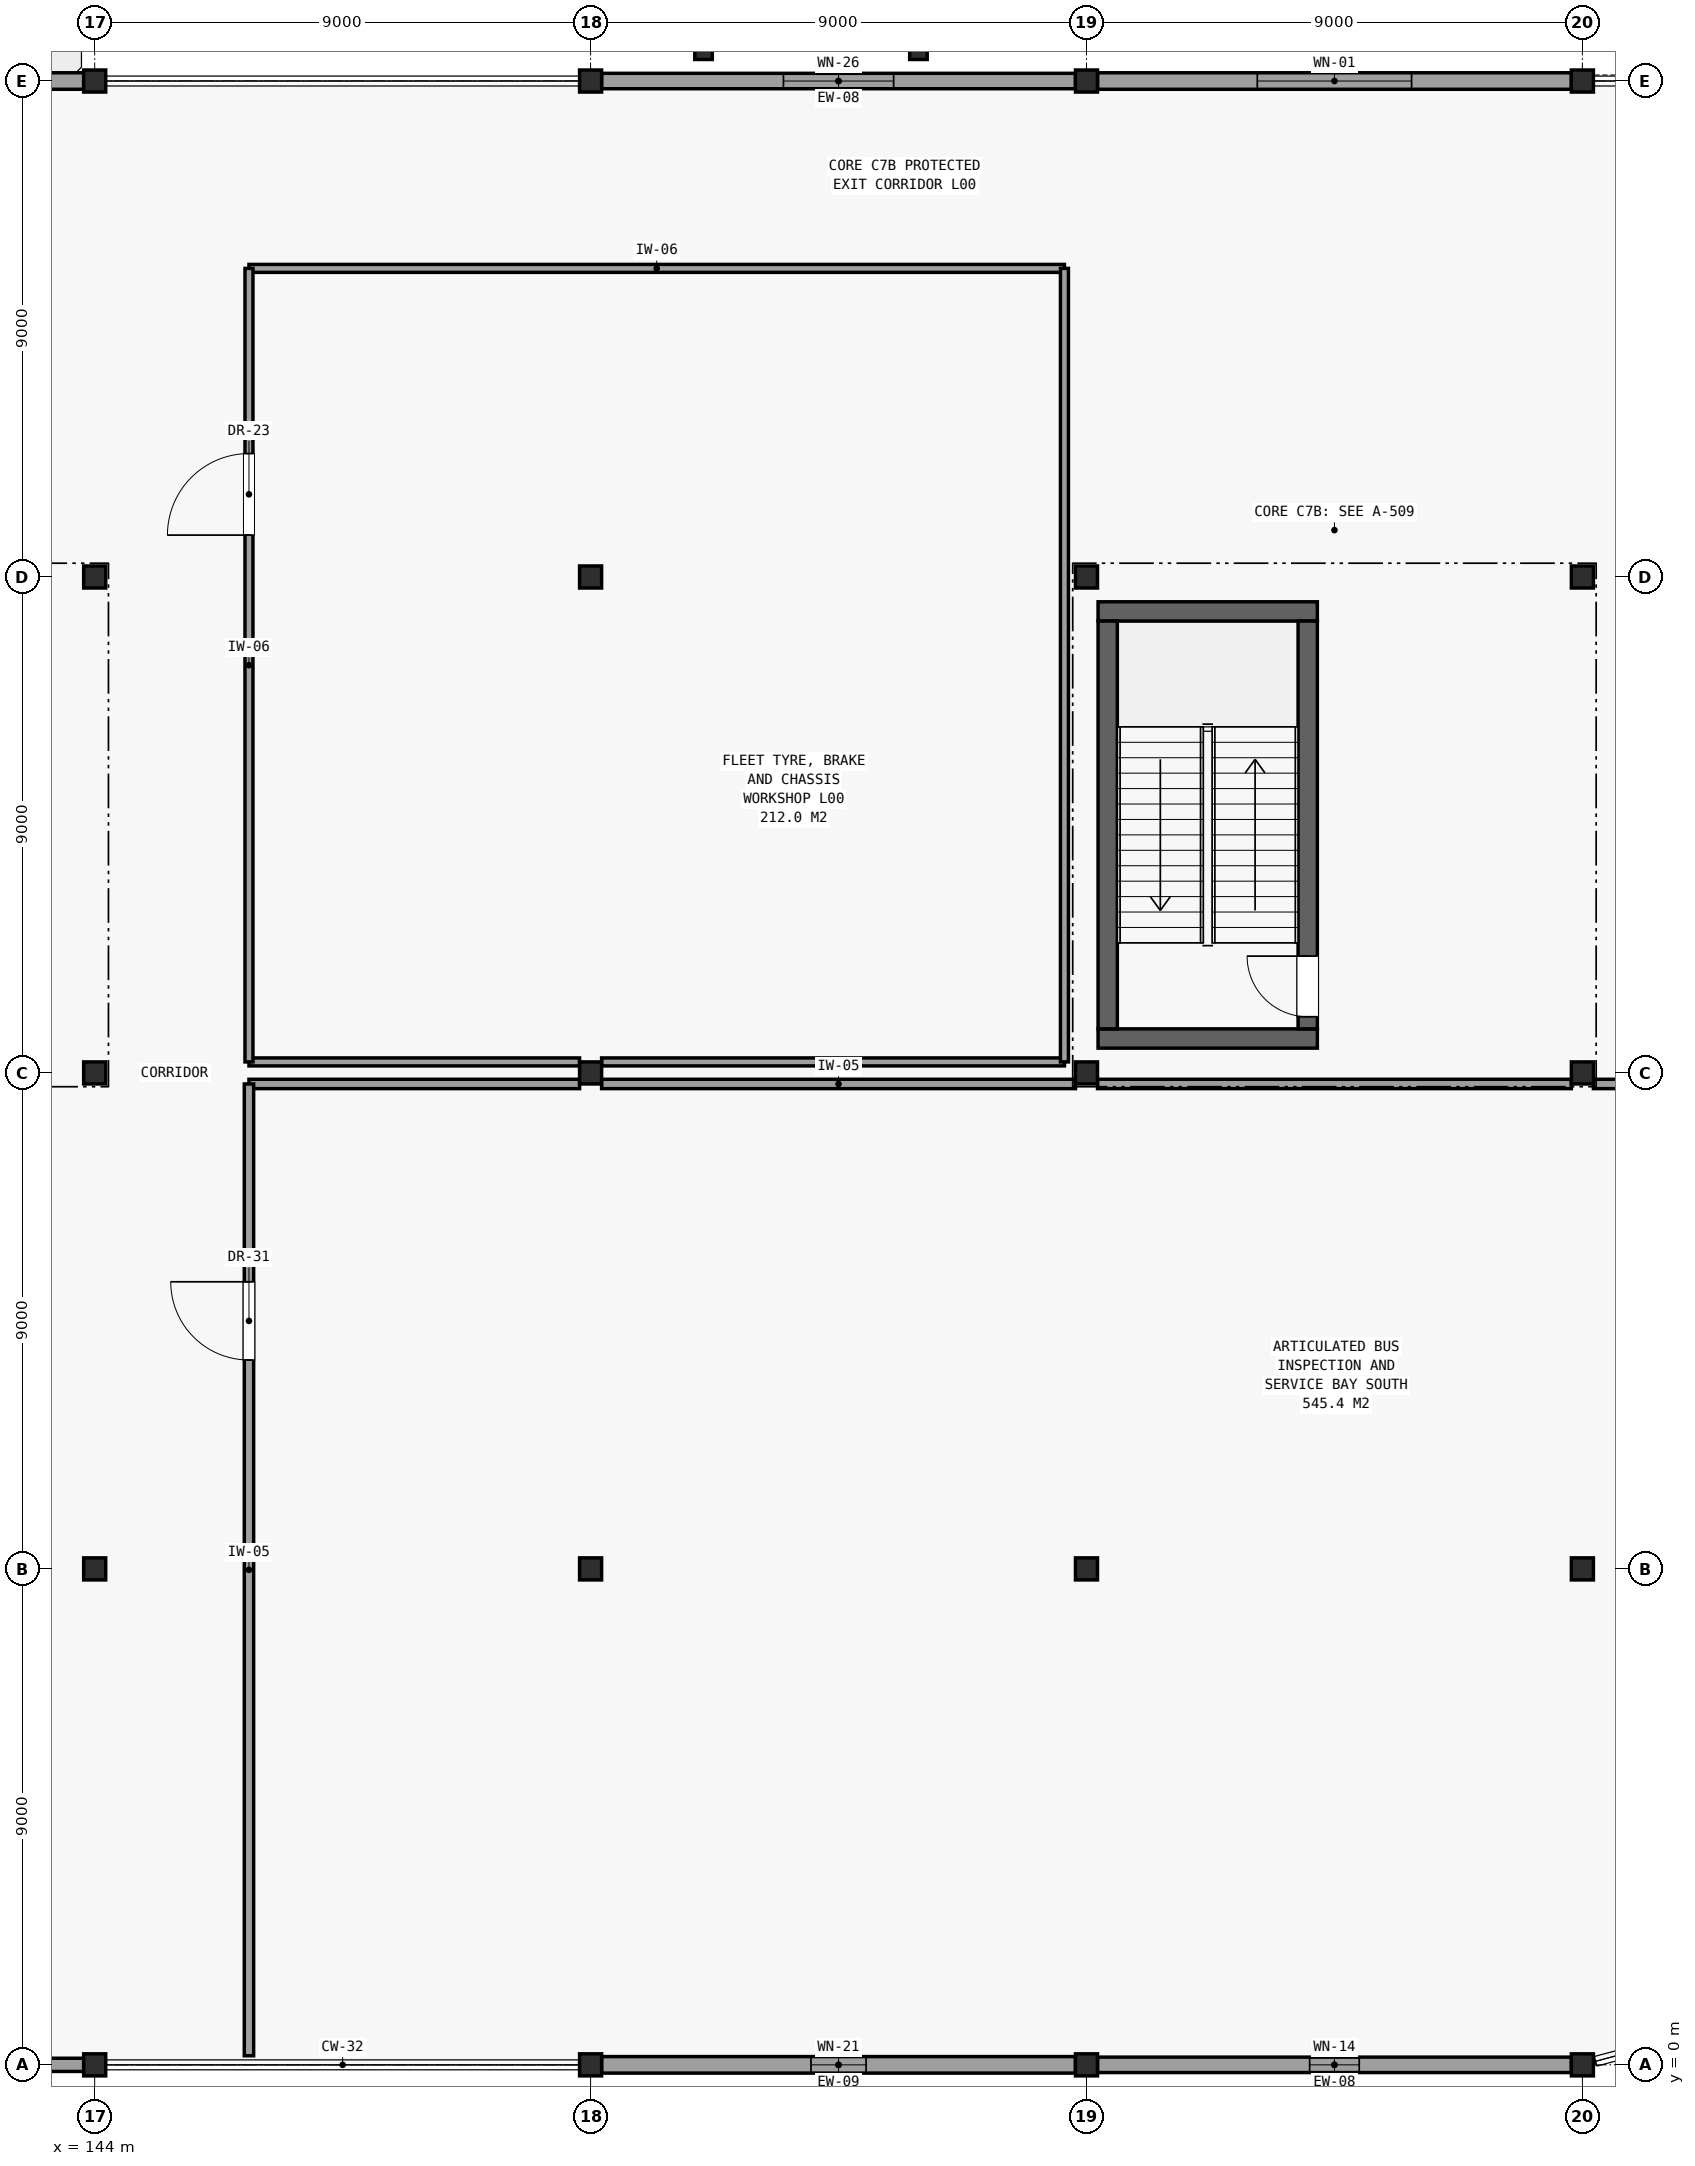
"""IFC4 building model, lengths in metres.
Left out: names, types, materials, properties, quantities, classifications, styles, units other than length and angle.
Written with IfcOpenShell. Run it as: python <this file> out.ifc"""

import sys

from ifc_helpers import new_model, si_unit, direction, frame, frame_2d, origin, origin_2d, place, context, subcontext, project, spatial, rectangle, hollow_rectangle, hollow_circle, extrude, element, fill, save


model = new_model("IFC4")
c1 = context("Model", 3, precision=1e-05, world=origin(), true_north=direction((0.0, 1.0)))
c2 = subcontext(c1, "Body", "Model", "MODEL_VIEW")
j1 = project(units=[si_unit("LENGTHUNIT", "METRE"), si_unit("PLANEANGLEUNIT", "RADIAN")], contexts=[c1])
p1 = place(None, origin())
s1 = spatial("IfcSite", under=j1, at=p1, CompositionType="ELEMENT")
p2 = place(p1, origin())
s2 = spatial("IfcBuilding", under=s1, at=p2, CompositionType="ELEMENT")
p3 = place(p2, origin())
s3 = spatial("IfcBuildingStorey", under=s2, at=p3, CompositionType="ELEMENT", Elevation=0.0)
for number, where, z_axis, x_axis in (
    (1, (144.0, 0.0, 0.0), (0.0, 0.0, 1.0), (1.0, 0.0, 0.0)),
    (2, (144.0, 9.0, 0.0), (0.0, 0.0, 1.0), (1.0, 0.0, 0.0)),
    (3, (144.0, 18.0, 0.0), (0.0, 0.0, 1.0), (1.0, 0.0, 0.0)),
    (4, (144.0, 27.0, 0.0), (0.0, 0.0, 1.0), (1.0, 0.0, 0.0)),
    (5, (144.0, 36.0, 0.0), (0.0, 0.0, 1.0), (1.0, 0.0, 0.0)),
    (6, (153.0, 0.0, 0.0), (0.0, 0.0, 1.0), (1.0, 0.0, 0.0)),
    (7, (153.0, 9.0, 0.0), (0.0, 0.0, 1.0), (1.0, 0.0, 0.0)),
    (8, (153.0, 18.0, 0.0), (0.0, 0.0, 1.0), (1.0, 0.0, 0.0)),
    (9, (153.0, 27.0, 0.0), (0.0, 0.0, 1.0), (1.0, 0.0, 0.0)),
    (10, (153.0, 36.0, 0.0), (0.0, 0.0, 1.0), (1.0, 0.0, 0.0)),
):
    element("IfcColumn", number, at=place(p3, frame(where, z_axis=z_axis, x_axis=x_axis)), inside=s3, PredefinedType="COLUMN", context=c2, shape_type="SweptSolid", body=[
        extrude(hollow_rectangle(XDim=0.4, YDim=0.4, WallThickness=0.019, at=origin_2d()), origin(), (0.0, 0.0, 1.0), 5.1),
    ])
for number, where, z_axis, x_axis in (
    (11, (155.05, 36.55, 0.0), (0.0, 0.0, 1.0), (1.0, 0.0, 0.0)),
    (12, (158.95, 36.55, 0.0), (0.0, 0.0, 1.0), (1.0, 0.0, 0.0)),
):
    element("IfcColumn", number, at=place(p3, frame(where, z_axis=z_axis, x_axis=x_axis)), inside=s3, PredefinedType="COLUMN", context=c2, shape_type="SweptSolid", body=[
        extrude(hollow_circle(Radius=0.159, WallThickness=0.01, at=origin_2d()), origin(), (0.0, 0.0, 1.0), 5.1),
    ])
for number, where, z_axis, x_axis in (
    (13, (162.0, 0.0, 0.0), (0.0, 0.0, 1.0), (1.0, 0.0, 0.0)),
    (14, (162.0, 9.0, 0.0), (0.0, 0.0, 1.0), (1.0, 0.0, 0.0)),
    (15, (162.0, 18.0, 0.0), (0.0, 0.0, 1.0), (1.0, 0.0, 0.0)),
    (16, (162.0, 27.0, 0.0), (0.0, 0.0, 1.0), (1.0, 0.0, 0.0)),
    (17, (162.0, 36.0, 0.0), (0.0, 0.0, 1.0), (1.0, 0.0, 0.0)),
    (18, (171.0, 0.0, 0.0), (0.0, 0.0, 1.0), (1.0, 0.0, 0.0)),
    (19, (171.0, 9.0, 0.0), (0.0, 0.0, 1.0), (1.0, 0.0, 0.0)),
    (20, (171.0, 18.0, 0.0), (0.0, 0.0, 1.0), (1.0, 0.0, 0.0)),
    (21, (171.0, 27.0, 0.0), (0.0, 0.0, 1.0), (1.0, 0.0, 0.0)),
    (22, (171.0, 36.0, 0.0), (0.0, 0.0, 1.0), (1.0, 0.0, 0.0)),
):
    element("IfcColumn", number, at=place(p3, frame(where, z_axis=z_axis, x_axis=x_axis)), inside=s3, PredefinedType="COLUMN", context=c2, shape_type="SweptSolid", body=[
        extrude(hollow_rectangle(XDim=0.4, YDim=0.4, WallThickness=0.019, at=origin_2d()), origin(), (0.0, 0.0, 1.0), 5.1),
    ])
p4 = place(p3, frame((135.2, 0.0, 0.0), z_axis=(0.0, 0.0, 1.0), x_axis=(1.0, 0.0, 0.0)))
e23 = element("IfcWall", 23, at=p4, inside=s3, PredefinedType="SOLIDWALL", context=c2, shape_type="SweptSolid", body=[
    extrude(rectangle(XDim=8.6, YDim=0.24, at=frame_2d((4.3, 0.0))), origin(), (0.0, 0.0, 1.0), 4.19),
])
p5 = place(p4, frame((3.7, 0.0, 0.95)))
e24 = element("IfcOpeningElement", 24, at=p5, cuts=e23, PredefinedType="OPENING", context=c2, shape_type="SweptSolid", body=[
    extrude(rectangle(XDim=1.2, YDim=1.8, at=frame_2d((0.6, 0.9))), frame((0.0, 0.131, 0.0), z_axis=(0.0, -1.0, 0.0), x_axis=(1.0, 0.0, 0.0)), (0.0, 0.0, 1.0), 0.262),
])
p6 = place(p3, frame((153.2, 0.0, 0.0), z_axis=(0.0, 0.0, 1.0), x_axis=(1.0, 0.0, 0.0)))
e25 = element("IfcWall", 25, at=p6, inside=s3, PredefinedType="SOLIDWALL", context=c2, shape_type="SweptSolid", body=[
    extrude(rectangle(XDim=8.6, YDim=0.3, at=frame_2d((4.3, 0.0))), origin(), (0.0, 0.0, 1.0), 4.19),
])
p7 = place(p6, frame((3.8, 0.0, 0.95)))
e26 = element("IfcOpeningElement", 26, at=p7, cuts=e25, PredefinedType="OPENING", context=c2, shape_type="SweptSolid", body=[
    extrude(rectangle(XDim=1.0, YDim=1.4, at=frame_2d((0.5, 0.7))), frame((0.0, 0.161, 0.0), z_axis=(0.0, -1.0, 0.0), x_axis=(1.0, 0.0, 0.0)), (0.0, 0.0, 1.0), 0.322),
])
p8 = place(p3, frame((162.2, 0.0, 0.0), z_axis=(0.0, 0.0, 1.0), x_axis=(1.0, 0.0, 0.0)))
e27 = element("IfcWall", 27, at=p8, inside=s3, PredefinedType="SOLIDWALL", context=c2, shape_type="SweptSolid", body=[
    extrude(rectangle(XDim=8.6, YDim=0.28, at=frame_2d((4.3, 0.0))), origin(), (0.0, 0.0, 1.0), 4.19),
])
p9 = place(p8, frame((3.85, 0.0, 0.95)))
e28 = element("IfcOpeningElement", 28, at=p9, cuts=e27, PredefinedType="OPENING", context=c2, shape_type="SweptSolid", body=[
    extrude(rectangle(XDim=0.9, YDim=1.3, at=frame_2d((0.45, 0.65))), frame((0.0, 0.151, 0.0), z_axis=(0.0, -1.0, 0.0), x_axis=(1.0, 0.0, 0.0)), (0.0, 0.0, 1.0), 0.302),
])
p10 = place(p3, frame((170.8, 36.0, 0.0), z_axis=(0.0, 0.0, 1.0), x_axis=(-1.0, 0.0, 0.0)))
e29 = element("IfcWall", 29, at=p10, inside=s3, PredefinedType="SOLIDWALL", context=c2, shape_type="SweptSolid", body=[
    extrude(rectangle(XDim=8.6, YDim=0.3, at=frame_2d((4.3, 0.0))), origin(), (0.0, 0.0, 1.0), 4.19),
])
p11 = place(p10, frame((2.9, 0.0, 0.95)))
e30 = element("IfcOpeningElement", 30, at=p11, cuts=e29, PredefinedType="OPENING", context=c2, shape_type="SweptSolid", body=[
    extrude(rectangle(XDim=2.8, YDim=1.1, at=frame_2d((1.4, 0.55))), frame((0.0, 0.161, 0.0), z_axis=(0.0, -1.0, 0.0), x_axis=(1.0, 0.0, 0.0)), (0.0, 0.0, 1.0), 0.322),
])
p12 = place(p3, frame((161.8, 36.0, 0.0), z_axis=(0.0, 0.0, 1.0), x_axis=(-1.0, 0.0, 0.0)))
e31 = element("IfcWall", 31, at=p12, inside=s3, PredefinedType="SOLIDWALL", context=c2, shape_type="SweptSolid", body=[
    extrude(rectangle(XDim=8.6, YDim=0.28, at=frame_2d((4.3, 0.0))), origin(), (0.0, 0.0, 1.0), 4.19),
])
p13 = place(p12, frame((3.3, 0.0, 0.95)))
e32 = element("IfcOpeningElement", 32, at=p13, cuts=e31, PredefinedType="OPENING", context=c2, shape_type="SweptSolid", body=[
    extrude(rectangle(XDim=2.0, YDim=1.1, at=frame_2d((1.0, 0.55))), frame((0.0, 0.151, 0.0), z_axis=(0.0, -1.0, 0.0), x_axis=(1.0, 0.0, 0.0)), (0.0, 0.0, 1.0), 0.302),
])
p14 = place(p3, frame((143.8, 36.0, 0.0), z_axis=(0.0, 0.0, 1.0), x_axis=(-1.0, 0.0, 0.0)))
e33 = element("IfcWall", 33, at=p14, inside=s3, PredefinedType="SOLIDWALL", context=c2, shape_type="SweptSolid", body=[
    extrude(rectangle(XDim=8.6, YDim=0.3, at=frame_2d((4.3, 0.0))), origin(), (0.0, 0.0, 1.0), 4.19),
])
p15 = place(p14, frame((5.2, 0.0, 0.0), z_axis=(0.0, 0.0, 1.0), x_axis=(-1.0, 0.0, 0.0)))
e34 = element("IfcOpeningElement", 34, at=p15, cuts=e33, PredefinedType="OPENING", context=c2, shape_type="SweptSolid", body=[
    extrude(rectangle(XDim=1.8, YDim=2.5, at=frame_2d((0.9, 1.25))), frame((0.0, 0.161, 0.0), z_axis=(0.0, -1.0, 0.0), x_axis=(1.0, 0.0, 0.0)), (0.0, 0.0, 1.0), 0.322),
])
for number, where, z_axis, x_axis in (
    (35, (162.21, 18.625, 0.0), (0.0, 0.0, 1.0), (1.0, 0.0, 0.0)),
    (36, (162.21, 26.375, 0.0), (0.0, 0.0, 1.0), (1.0, 0.0, 0.0)),
):
    element("IfcWall", number, at=place(p3, frame(where, z_axis=z_axis, x_axis=x_axis)), inside=s3, PredefinedType="SHEAR", context=c2, shape_type="SweptSolid", body=[
        extrude(rectangle(XDim=3.98, YDim=0.35, at=frame_2d((1.99, 0.0))), origin(), (0.0, 0.0, 1.0), 4.84),
    ])
p16 = place(p3, frame((162.385, 18.8, 0.0), z_axis=(0.0, 0.0, 1.0), x_axis=(0.0, 1.0, 0.0)))
e37 = element("IfcWall", 37, at=p16, inside=s3, PredefinedType="SHEAR", context=c2, shape_type="SweptSolid", body=[
    extrude(rectangle(XDim=7.4, YDim=0.35, at=frame_2d((3.7, 0.0))), origin(), (0.0, 0.0, 1.0), 4.84),
])
p17 = place(p3, frame((166.015, 18.8, 0.0), z_axis=(0.0, 0.0, 1.0), x_axis=(0.0, 1.0, 0.0)))
e38 = element("IfcWall", 38, at=p17, inside=s3, PredefinedType="SHEAR", context=c2, shape_type="SweptSolid", body=[
    extrude(rectangle(XDim=7.4, YDim=0.35, at=frame_2d((3.7, 0.0))), origin(), (0.0, 0.0, 1.0), 4.84),
])
p18 = place(p17, frame((0.22, 0.0, 0.0)))
e39 = element("IfcOpeningElement", 39, at=p18, cuts=e38, PredefinedType="OPENING", context=c2, shape_type="SweptSolid", body=[
    extrude(rectangle(XDim=1.1, YDim=2.15, at=frame_2d((0.55, 1.075))), frame((0.0, 0.186, 0.0), z_axis=(0.0, -1.0, 0.0), x_axis=(1.0, 0.0, 0.0)), (0.0, 0.0, 1.0), 0.372),
])
p19 = place(p3, frame((146.8, 17.8, 0.0), z_axis=(0.0, 0.0, 1.0), x_axis=(1.0, 0.0, 0.0)))
e40 = element("IfcWall", 40, at=p19, inside=s3, PredefinedType="PARTITIONING", context=c2, shape_type="SweptSolid", body=[
    extrude(rectangle(XDim=6.0, YDim=0.17, at=frame_2d((3.0, 0.0))), origin(), (0.0, 0.0, 1.0), 4.19),
])
for number, where, z_axis, x_axis in (
    (41, (153.2, 17.8, 0.0), (0.0, 0.0, 1.0), (1.0, 0.0, 0.0)),
    (42, (162.2, 17.8, 0.0), (0.0, 0.0, 1.0), (1.0, 0.0, 0.0)),
    (43, (171.2, 17.8, 0.0), (0.0, 0.0, 1.0), (1.0, 0.0, 0.0)),
):
    element("IfcWall", number, at=place(p3, frame(where, z_axis=z_axis, x_axis=x_axis)), inside=s3, PredefinedType="PARTITIONING", context=c2, shape_type="SweptSolid", body=[
        extrude(rectangle(XDim=8.6, YDim=0.17, at=frame_2d((4.3, 0.0))), origin(), (0.0, 0.0, 1.0), 4.19),
    ])
p20 = place(p3, frame((146.8, 0.165, 0.0), z_axis=(0.0, 0.0, 1.0), x_axis=(0.0, 1.0, 0.0)))
e44 = element("IfcWall", 44, at=p20, inside=s3, PredefinedType="PARTITIONING", context=c2, shape_type="SweptSolid", body=[
    extrude(rectangle(XDim=17.635, YDim=0.17, at=frame_2d((8.817, 0.0))), origin(), (0.0, 0.0, 1.0), 4.24),
])
p21 = place(p20, frame((12.625, 0.0, 0.0)))
e45 = element("IfcOpeningElement", 45, at=p21, cuts=e44, PredefinedType="OPENING", context=c2, shape_type="SweptSolid", body=[
    extrude(rectangle(XDim=1.42, YDim=2.3, at=frame_2d((0.71, 1.15))), frame((0.0, 0.096, 0.0), z_axis=(0.0, -1.0, 0.0), x_axis=(1.0, 0.0, 0.0)), (0.0, 0.0, 1.0), 0.192),
])
p22 = place(p3, frame((146.8, 18.2, 0.0), z_axis=(0.0, 0.0, 1.0), x_axis=(1.0, 0.0, 0.0)))
e46 = element("IfcWall", 46, at=p22, inside=s3, PredefinedType="PARTITIONING", context=c2, shape_type="SweptSolid", body=[
    extrude(rectangle(XDim=6.0, YDim=0.145, at=frame_2d((3.0, 0.0))), origin(), (0.0, 0.0, 1.0), 4.19),
])
p23 = place(p3, frame((153.2, 18.2, 0.0), z_axis=(0.0, 0.0, 1.0), x_axis=(1.0, 0.0, 0.0)))
e47 = element("IfcWall", 47, at=p23, inside=s3, PredefinedType="PARTITIONING", context=c2, shape_type="SweptSolid", body=[
    extrude(rectangle(XDim=8.4, YDim=0.145, at=frame_2d((4.2, 0.0))), origin(), (0.0, 0.0, 1.0), 4.19),
])
p24 = place(p3, frame((146.8, 32.6, 0.0), z_axis=(0.0, 0.0, 1.0), x_axis=(1.0, 0.0, 0.0)))
e48 = element("IfcWall", 48, at=p24, inside=s3, PredefinedType="PARTITIONING", context=c2, shape_type="SweptSolid", body=[
    extrude(rectangle(XDim=14.8, YDim=0.145, at=frame_2d((7.4, 0.0))), origin(), (0.0, 0.0, 1.0), 4.19),
])
p25 = place(p3, frame((146.8, 18.2, 0.0), z_axis=(0.0, 0.0, 1.0), x_axis=(0.0, 1.0, 0.0)))
e49 = element("IfcWall", 49, at=p25, inside=s3, PredefinedType="PARTITIONING", context=c2, shape_type="SweptSolid", body=[
    extrude(rectangle(XDim=14.4, YDim=0.145, at=frame_2d((7.2, 0.0))), origin(), (0.0, 0.0, 1.0), 4.24),
])
p26 = place(p25, frame((9.56, 0.0, 0.0)))
e50 = element("IfcOpeningElement", 50, at=p26, cuts=e49, PredefinedType="OPENING", context=c2, shape_type="SweptSolid", body=[
    extrude(rectangle(XDim=1.48, YDim=2.35, at=frame_2d((0.74, 1.175))), frame((0.0, 0.083, 0.0), z_axis=(0.0, -1.0, 0.0), x_axis=(1.0, 0.0, 0.0)), (0.0, 0.0, 1.0), 0.167),
])
p27 = place(p3, frame((161.6, 18.2, 0.0), z_axis=(0.0, 0.0, 1.0), x_axis=(0.0, 1.0, 0.0)))
e51 = element("IfcWall", 51, at=p27, inside=s3, PredefinedType="PARTITIONING", context=c2, shape_type="SweptSolid", body=[
    extrude(rectangle(XDim=14.4, YDim=0.145, at=frame_2d((7.2, 0.0))), origin(), (0.0, 0.0, 1.0), 4.24),
])
p28 = place(p7, origin())
e52 = element("IfcWindow", 52, at=p28, inside=s3, PartitioningType="SINGLE_PANEL", PredefinedType="WINDOW", context=c2, shape_type="SweptSolid", body=[
    extrude(rectangle(XDim=1.0, YDim=1.4, at=frame_2d((0.5, 0.7))), frame((0.0, 0.03, 0.0), z_axis=(0.0, -1.0, 0.0), x_axis=(1.0, 0.0, 0.0)), (0.0, 0.0, 1.0), 0.06),
])
fill(e26, e52)
p29 = place(p9, origin())
e53 = element("IfcWindow", 53, at=p29, inside=s3, PartitioningType="SINGLE_PANEL", PredefinedType="WINDOW", context=c2, shape_type="SweptSolid", body=[
    extrude(rectangle(XDim=0.9, YDim=1.3, at=frame_2d((0.45, 0.65))), frame((0.0, 0.03, 0.0), z_axis=(0.0, -1.0, 0.0), x_axis=(1.0, 0.0, 0.0)), (0.0, 0.0, 1.0), 0.06),
])
fill(e28, e53)
p30 = place(p11, origin())
e54 = element("IfcWindow", 54, at=p30, inside=s3, PartitioningType="SINGLE_PANEL", PredefinedType="WINDOW", context=c2, shape_type="SweptSolid", body=[
    extrude(rectangle(XDim=2.8, YDim=1.1, at=frame_2d((1.4, 0.55))), frame((0.0, 0.03, 0.0), z_axis=(0.0, -1.0, 0.0), x_axis=(1.0, 0.0, 0.0)), (0.0, 0.0, 1.0), 0.06),
])
fill(e30, e54)
p31 = place(p13, origin())
e55 = element("IfcWindow", 55, at=p31, inside=s3, PartitioningType="SINGLE_PANEL", PredefinedType="WINDOW", context=c2, shape_type="SweptSolid", body=[
    extrude(rectangle(XDim=2.0, YDim=1.1, at=frame_2d((1.0, 0.55))), frame((0.0, 0.03, 0.0), z_axis=(0.0, -1.0, 0.0), x_axis=(1.0, 0.0, 0.0)), (0.0, 0.0, 1.0), 0.06),
])
fill(e32, e55)
p32 = place(p18, origin())
e56 = element("IfcDoor", 56, at=p32, inside=s3, OperationType="SINGLE_SWING_RIGHT", PredefinedType="DOOR", context=c2, shape_type="SweptSolid", body=[
    extrude(rectangle(XDim=1.1, YDim=2.15, at=frame_2d((0.55, 1.075))), frame((0.0, 0.025, 0.0), z_axis=(0.0, -1.0, 0.0), x_axis=(1.0, 0.0, 0.0)), (0.0, 0.0, 1.0), 0.05),
])
fill(e39, e56)
p33 = place(p21, origin())
e57 = element("IfcDoor", 57, at=p33, inside=s3, OperationType="SINGLE_SWING_RIGHT", PredefinedType="DOOR", context=c2, shape_type="SweptSolid", body=[
    extrude(rectangle(XDim=1.42, YDim=2.3, at=frame_2d((0.71, 1.15))), frame((0.0, 0.025, 0.0), z_axis=(0.0, -1.0, 0.0), x_axis=(1.0, 0.0, 0.0)), (0.0, 0.0, 1.0), 0.05),
])
fill(e45, e57)
p34 = place(p26, origin())
e58 = element("IfcDoor", 58, at=p34, inside=s3, OperationType="SINGLE_SWING_LEFT", PredefinedType="DOOR", context=c2, shape_type="SweptSolid", body=[
    extrude(rectangle(XDim=1.48, YDim=2.35, at=frame_2d((0.74, 1.175))), frame((0.0, 0.025, 0.0), z_axis=(0.0, -1.0, 0.0), x_axis=(1.0, 0.0, 0.0)), (0.0, 0.0, 1.0), 0.05),
])
fill(e50, e58)
save(model, sys.argv[1])
